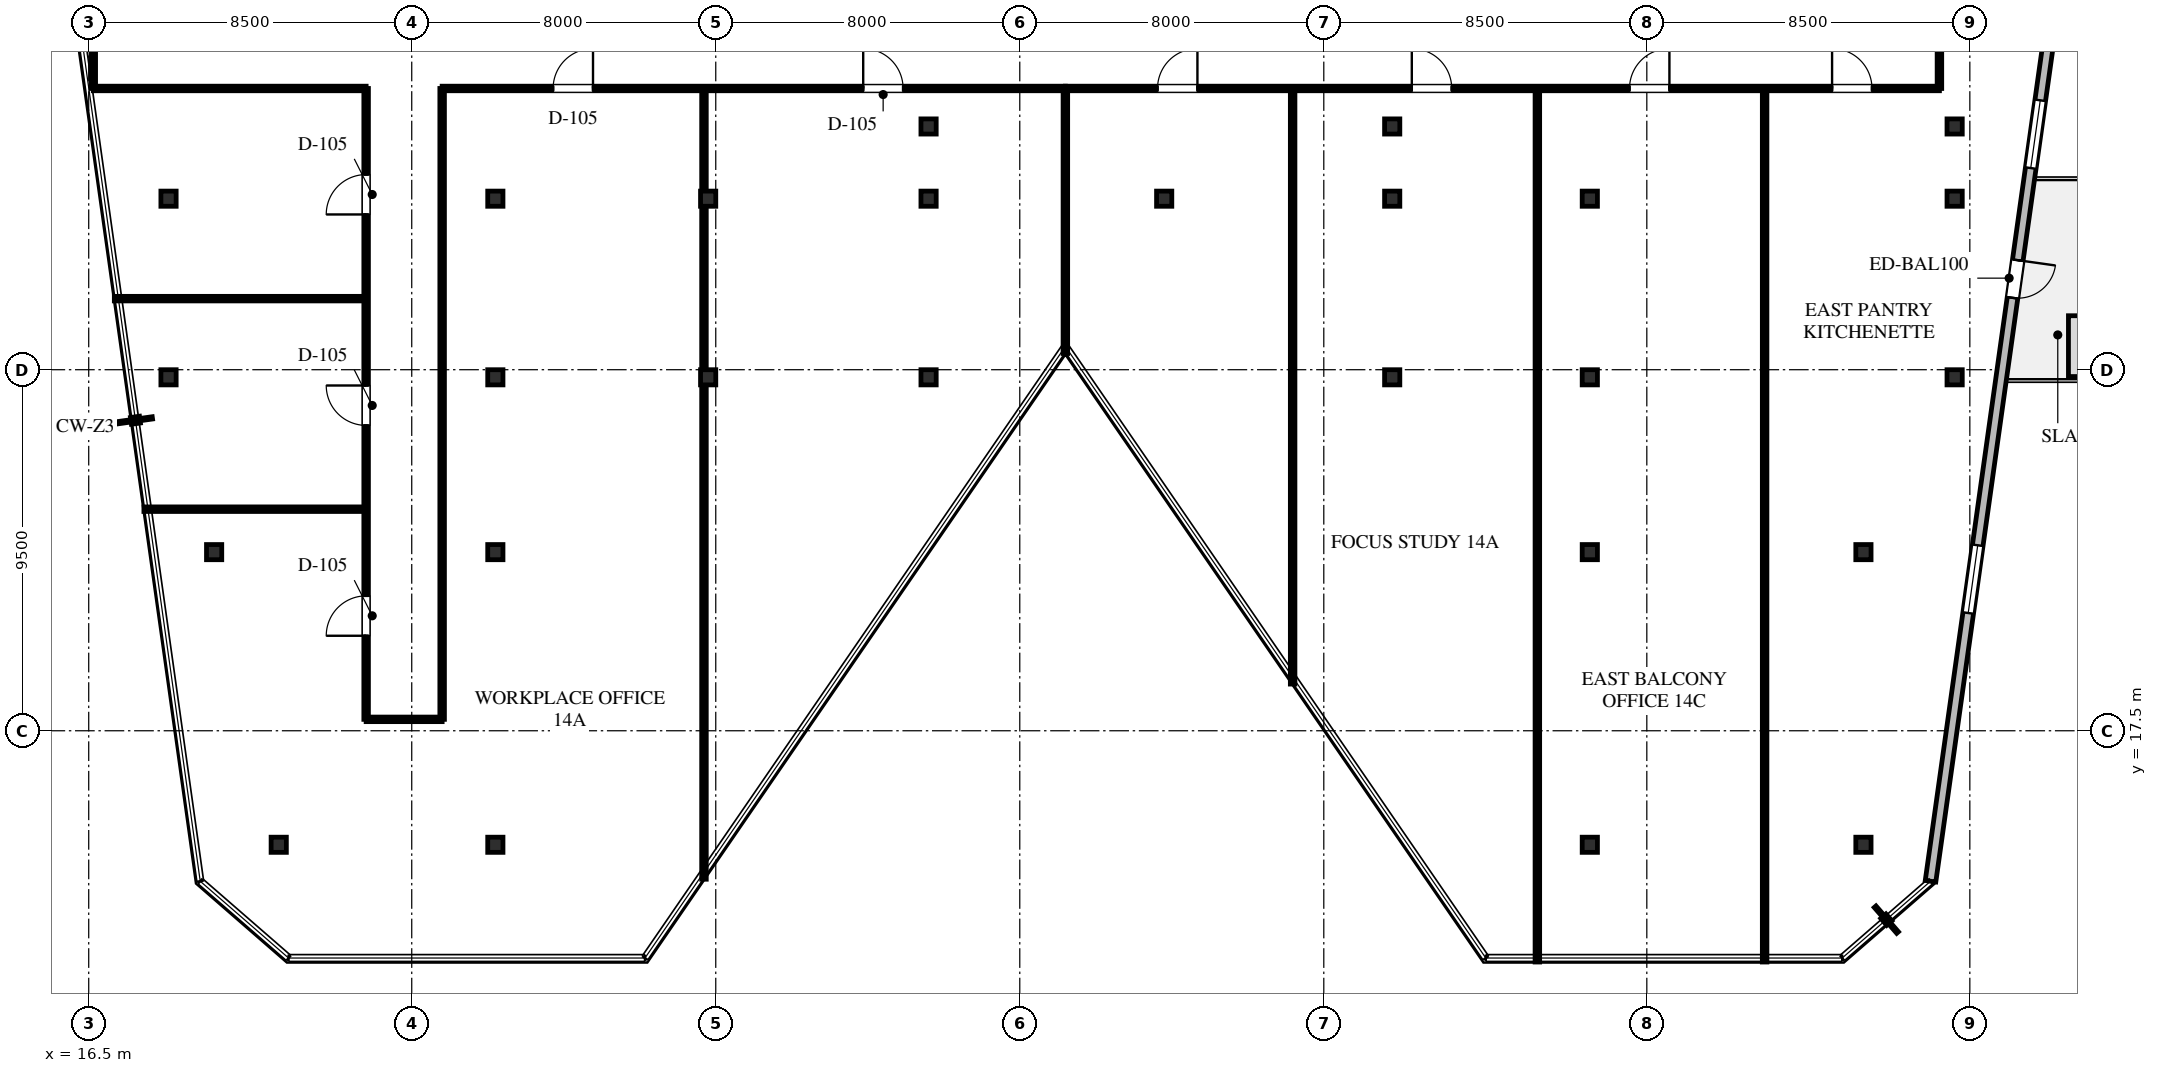
"""IFC4 building model, lengths in metres.
Left out: names, types, materials, properties, quantities, classifications, styles, units other than length and angle.
Written with IfcOpenShell. Run it as: python <this file> out.ifc"""

import sys

from ifc_helpers import new_model, si_unit, direction, frame, frame_2d, origin, origin_2d, place, context, subcontext, project, spatial, rectangle, i_section, extrude, element, fill, save


model = new_model("IFC4")
c1 = context("Model", 3, precision=1e-05, world=origin(), true_north=direction((0.0, 1.0)))
c2 = subcontext(c1, "Body", "Model", "MODEL_VIEW")
j1 = project(units=[si_unit("LENGTHUNIT", "METRE"), si_unit("PLANEANGLEUNIT", "RADIAN")], contexts=[c1])
p1 = place(None, origin())
s1 = spatial("IfcSite", under=j1, at=p1, CompositionType="ELEMENT")
p2 = place(p1, origin())
s2 = spatial("IfcBuilding", under=s1, at=p2, CompositionType="ELEMENT")
p3 = place(p2, frame((0.0, 0.0, 212.5)))
s3 = spatial("IfcBuildingStorey", under=s2, at=p3, CompositionType="ELEMENT", Elevation=212.5)
for number, where, z_axis, x_axis in (
    (1, (21.5, 14.5, 0.0), (0.0, 0.0, 1.0), (1.0, 0.0, 0.0)),
    (2, (18.6, 26.8, 0.0), (0.0, 0.0, 1.0), (1.0, 0.0, 0.0)),
    (3, (27.2, 26.8, 0.0), (0.0, 0.0, 1.0), (1.0, 0.0, 0.0)),
    (4, (32.8, 26.8, 0.0), (0.0, 0.0, 1.0), (1.0, 0.0, 0.0)),
    (5, (38.6, 26.8, 0.0), (0.0, 0.0, 1.0), (1.0, 0.0, 0.0)),
    (6, (50.8, 26.8, 0.0), (0.0, 0.0, 1.0), (1.0, 0.0, 0.0)),
    (7, (56.0, 26.8, 0.0), (0.0, 0.0, 1.0), (1.0, 0.0, 0.0)),
    (8, (65.6, 26.8, 0.0), (0.0, 0.0, 1.0), (1.0, 0.0, 0.0)),
    (9, (18.6, 31.5, 0.0), (0.0, 0.0, 1.0), (1.0, 0.0, 0.0)),
    (10, (27.2, 31.5, 0.0), (0.0, 0.0, 1.0), (1.0, 0.0, 0.0)),
    (11, (32.8, 31.5, 0.0), (0.0, 0.0, 1.0), (1.0, 0.0, 0.0)),
    (12, (27.2, 14.5, 0.0), (0.0, 0.0, 1.0), (1.0, 0.0, 0.0)),
    (13, (38.6, 31.5, 0.0), (0.0, 0.0, 1.0), (1.0, 0.0, 0.0)),
    (14, (44.8, 31.5, 0.0), (0.0, 0.0, 1.0), (1.0, 0.0, 0.0)),
    (15, (50.8, 31.5, 0.0), (0.0, 0.0, 1.0), (1.0, 0.0, 0.0)),
    (16, (56.0, 31.5, 0.0), (0.0, 0.0, 1.0), (1.0, 0.0, 0.0)),
    (17, (65.6, 31.5, 0.0), (0.0, 0.0, 1.0), (1.0, 0.0, 0.0)),
    (18, (56.0, 14.5, 0.0), (0.0, 0.0, 1.0), (1.0, 0.0, 0.0)),
    (19, (63.2, 14.5, 0.0), (0.0, 0.0, 1.0), (1.0, 0.0, 0.0)),
    (20, (19.8, 22.2, 0.0), (0.0, 0.0, 1.0), (1.0, 0.0, 0.0)),
    (21, (27.2, 22.2, 0.0), (0.0, 0.0, 1.0), (1.0, 0.0, 0.0)),
    (22, (56.0, 22.2, 0.0), (0.0, 0.0, 1.0), (1.0, 0.0, 0.0)),
    (23, (63.2, 22.2, 0.0), (0.0, 0.0, 1.0), (1.0, 0.0, 0.0)),
    (24, (38.6, 33.4, 0.0), (0.0, 0.0, 1.0), (1.0, 0.0, 0.0)),
    (25, (50.8, 33.4, 0.0), (0.0, 0.0, 1.0), (1.0, 0.0, 0.0)),
    (26, (65.6, 33.4, 0.0), (0.0, 0.0, 1.0), (1.0, 0.0, 0.0)),
):
    element("IfcColumn", number, at=place(p3, frame(where, z_axis=z_axis, x_axis=x_axis)), inside=s3, PredefinedType="COLUMN", context=c2, shape_type="SweptSolid", body=[
        extrude(i_section(OverallWidth=0.401, OverallDepth=0.399, WebThickness=0.025, FlangeThickness=0.04, FilletRadius=0.03, at=origin_2d()), origin(), (0.0, 0.0, 1.0), 4.0),
    ])
p4 = place(p3, frame((68.375, 37.8, 0.0), z_axis=(0.0, 0.0, 1.0), x_axis=(-0.139173290738, -0.99026804207, 0.0)))
e27 = element("IfcWall", 27, at=p4, inside=s3, PredefinedType="STANDARD", context=c2, shape_type="SweptSolid", body=[
    extrude(rectangle(XDim=24.498, YDim=0.28, at=frame_2d((12.249, 0.0))), origin(), (0.0, 0.0, 1.0), 3.755),
])
p5 = place(p4, frame((7.996, 0.0, 0.0)))
e28 = element("IfcOpeningElement", 28, at=p5, cuts=e27, PredefinedType="OPENING", context=c2, shape_type="SweptSolid", body=[
    extrude(rectangle(XDim=1.0, YDim=2.15, at=frame_2d((0.5, 1.075))), frame((0.0, 0.15, 0.0), z_axis=(0.0, -1.0, 0.0), x_axis=(1.0, 0.0, 0.0)), (0.0, 0.0, 1.0), 0.3),
])
p6 = place(p4, frame((3.749, 0.0, 0.65)))
e29 = element("IfcOpeningElement", 29, at=p6, cuts=e27, PredefinedType="OPENING", context=c2, shape_type="SweptSolid", body=[
    extrude(rectangle(XDim=1.8, YDim=2.1, at=frame_2d((0.9, 1.05))), frame((0.0, 0.15, 0.0), z_axis=(0.0, -1.0, 0.0), x_axis=(1.0, 0.0, 0.0)), (0.0, 0.0, 1.0), 0.3),
])
p7 = place(p4, frame((15.571, 0.0, 0.65)))
e30 = element("IfcOpeningElement", 30, at=p7, cuts=e27, PredefinedType="OPENING", context=c2, shape_type="SweptSolid", body=[
    extrude(rectangle(XDim=1.8, YDim=2.1, at=frame_2d((0.9, 1.05))), frame((0.0, 0.15, 0.0), z_axis=(0.0, -1.0, 0.0), x_axis=(1.0, 0.0, 0.0)), (0.0, 0.0, 1.0), 0.3),
])
p8 = place(p3, frame((16.62, 34.4, 0.0), z_axis=(0.0, 0.0, 1.0), x_axis=(1.0, 0.0, 0.0)))
e31 = element("IfcWall", 31, at=p8, inside=s3, PredefinedType="PARTITIONING", context=c2, shape_type="SweptSolid", body=[
    extrude(rectangle(XDim=7.18, YDim=0.12, at=frame_2d((3.59, 0.0))), origin(), (0.0, 0.0, 1.0), 2.982),
])
p9 = place(p3, frame((25.8, 34.4, 0.0), z_axis=(0.0, 0.0, 1.0), x_axis=(1.0, 0.0, 0.0)))
e32 = element("IfcWall", 32, at=p9, inside=s3, PredefinedType="PARTITIONING", context=c2, shape_type="SweptSolid", body=[
    extrude(rectangle(XDim=16.4, YDim=0.12, at=frame_2d((8.2, 0.0))), origin(), (0.0, 0.0, 1.0), 2.982),
])
p10 = place(p9, frame((2.92, 0.0, 0.0)))
e33 = element("IfcOpeningElement", 33, at=p10, cuts=e32, PredefinedType="OPENING", context=c2, shape_type="SweptSolid", body=[
    extrude(rectangle(XDim=1.05, YDim=2.2, at=frame_2d((0.525, 1.1))), frame((0.0, 0.07, 0.0), z_axis=(0.0, -1.0, 0.0), x_axis=(1.0, 0.0, 0.0)), (0.0, 0.0, 1.0), 0.14),
])
p11 = place(p9, frame((11.08, 0.0, 0.0)))
e34 = element("IfcOpeningElement", 34, at=p11, cuts=e32, PredefinedType="OPENING", context=c2, shape_type="SweptSolid", body=[
    extrude(rectangle(XDim=1.05, YDim=2.2, at=frame_2d((0.525, 1.1))), frame((0.0, 0.07, 0.0), z_axis=(0.0, -1.0, 0.0), x_axis=(1.0, 0.0, 0.0)), (0.0, 0.0, 1.0), 0.14),
])
p12 = place(p3, frame((42.2, 34.4, 0.0), z_axis=(0.0, 0.0, 1.0), x_axis=(1.0, 0.0, 0.0)))
e35 = element("IfcWall", 35, at=p12, inside=s3, PredefinedType="PARTITIONING", context=c2, shape_type="SweptSolid", body=[
    extrude(rectangle(XDim=23.0, YDim=0.12, at=frame_2d((11.5, 0.0))), origin(), (0.0, 0.0, 1.0), 2.982),
])
p13 = place(p12, frame((2.425, 0.0, 0.0)))
e36 = element("IfcOpeningElement", 36, at=p13, cuts=e35, PredefinedType="OPENING", context=c2, shape_type="SweptSolid", body=[
    extrude(rectangle(XDim=1.05, YDim=2.2, at=frame_2d((0.525, 1.1))), frame((0.0, 0.07, 0.0), z_axis=(0.0, -1.0, 0.0), x_axis=(1.0, 0.0, 0.0)), (0.0, 0.0, 1.0), 0.14),
])
p14 = place(p12, frame((9.116, 0.0, 0.0)))
e37 = element("IfcOpeningElement", 37, at=p14, cuts=e35, PredefinedType="OPENING", context=c2, shape_type="SweptSolid", body=[
    extrude(rectangle(XDim=1.05, YDim=2.2, at=frame_2d((0.525, 1.1))), frame((0.0, 0.07, 0.0), z_axis=(0.0, -1.0, 0.0), x_axis=(1.0, 0.0, 0.0)), (0.0, 0.0, 1.0), 0.14),
])
p15 = place(p12, frame((14.845, 0.0, 0.0)))
e38 = element("IfcOpeningElement", 38, at=p15, cuts=e35, PredefinedType="OPENING", context=c2, shape_type="SweptSolid", body=[
    extrude(rectangle(XDim=1.05, YDim=2.2, at=frame_2d((0.525, 1.1))), frame((0.0, 0.07, 0.0), z_axis=(0.0, -1.0, 0.0), x_axis=(1.0, 0.0, 0.0)), (0.0, 0.0, 1.0), 0.14),
])
p16 = place(p12, frame((20.175, 0.0, 0.0)))
e39 = element("IfcOpeningElement", 39, at=p16, cuts=e35, PredefinedType="OPENING", context=c2, shape_type="SweptSolid", body=[
    extrude(rectangle(XDim=1.05, YDim=2.2, at=frame_2d((0.525, 1.1))), frame((0.0, 0.07, 0.0), z_axis=(0.0, -1.0, 0.0), x_axis=(1.0, 0.0, 0.0)), (0.0, 0.0, 1.0), 0.14),
])
p17 = place(p3, frame((16.62, 34.4, 0.0), z_axis=(0.0, 0.0, 1.0), x_axis=(0.0, 1.0, 0.0)))
e40 = element("IfcWall", 40, at=p17, inside=s3, PredefinedType="PARTITIONING", context=c2, shape_type="SweptSolid", body=[
    extrude(rectangle(XDim=3.65, YDim=0.12, at=frame_2d((1.825, 0.0))), origin(), (0.0, 0.0, 1.0), 3.755),
])
p18 = place(p3, frame((65.2, 34.4, 0.0), z_axis=(0.0, 0.0, 1.0), x_axis=(0.0, 1.0, 0.0)))
e41 = element("IfcWall", 41, at=p18, inside=s3, PredefinedType="PARTITIONING", context=c2, shape_type="SweptSolid", body=[
    extrude(rectangle(XDim=3.317, YDim=0.12, at=frame_2d((1.659, 0.0))), origin(), (0.0, 0.0, 1.0), 2.982),
])
p19 = place(p3, frame((23.8, 17.8, 0.0), z_axis=(0.0, 0.0, 1.0), x_axis=(0.0, 1.0, 0.0)))
e42 = element("IfcWall", 42, at=p19, inside=s3, PredefinedType="PARTITIONING", context=c2, shape_type="SweptSolid", body=[
    extrude(rectangle(XDim=16.6, YDim=0.12, at=frame_2d((8.3, 0.0))), origin(), (0.0, 0.0, 1.0), 2.982),
])
p20 = place(p19, frame((2.2, 0.0, 0.0)))
e43 = element("IfcOpeningElement", 43, at=p20, cuts=e42, PredefinedType="OPENING", context=c2, shape_type="SweptSolid", body=[
    extrude(rectangle(XDim=1.05, YDim=2.2, at=frame_2d((0.525, 1.1))), frame((0.0, 0.07, 0.0), z_axis=(0.0, -1.0, 0.0), x_axis=(1.0, 0.0, 0.0)), (0.0, 0.0, 1.0), 0.14),
])
p21 = place(p19, frame((7.735, 0.0, 0.0)))
e44 = element("IfcOpeningElement", 44, at=p21, cuts=e42, PredefinedType="OPENING", context=c2, shape_type="SweptSolid", body=[
    extrude(rectangle(XDim=1.05, YDim=2.2, at=frame_2d((0.525, 1.1))), frame((0.0, 0.07, 0.0), z_axis=(0.0, -1.0, 0.0), x_axis=(1.0, 0.0, 0.0)), (0.0, 0.0, 1.0), 0.14),
])
p22 = place(p19, frame((13.285, 0.0, 0.0)))
e45 = element("IfcOpeningElement", 45, at=p22, cuts=e42, PredefinedType="OPENING", context=c2, shape_type="SweptSolid", body=[
    extrude(rectangle(XDim=1.05, YDim=2.2, at=frame_2d((0.525, 1.1))), frame((0.0, 0.07, 0.0), z_axis=(0.0, -1.0, 0.0), x_axis=(1.0, 0.0, 0.0)), (0.0, 0.0, 1.0), 0.14),
])
p23 = place(p3, frame((25.8, 17.8, 0.0), z_axis=(0.0, 0.0, 1.0), x_axis=(0.0, 1.0, 0.0)))
e46 = element("IfcWall", 46, at=p23, inside=s3, PredefinedType="PARTITIONING", context=c2, shape_type="SweptSolid", body=[
    extrude(rectangle(XDim=16.6, YDim=0.12, at=frame_2d((8.3, 0.0))), origin(), (0.0, 0.0, 1.0), 2.982),
])
p24 = place(p3, frame((23.8, 17.8, 0.0), z_axis=(0.0, 0.0, 1.0), x_axis=(1.0, 0.0, 0.0)))
e47 = element("IfcWall", 47, at=p24, inside=s3, PredefinedType="PARTITIONING", context=c2, shape_type="SweptSolid", body=[
    extrude(rectangle(XDim=2.0, YDim=0.12, at=frame_2d((1.0, 0.0))), origin(), (0.0, 0.0, 1.0), 3.147),
])
p25 = place(p3, frame((17.953, 23.33, 0.0), z_axis=(0.0, 0.0, 1.0), x_axis=(1.0, 0.0, 0.0)))
e48 = element("IfcWall", 48, at=p25, inside=s3, PredefinedType="PARTITIONING", context=c2, shape_type="SweptSolid", body=[
    extrude(rectangle(XDim=5.779, YDim=0.12, at=frame_2d((2.89, 0.0))), origin(), (0.0, 0.0, 1.0), 3.147),
])
p26 = place(p3, frame((17.174, 28.87, 0.0), z_axis=(0.0, 0.0, 1.0), x_axis=(1.0, 0.0, 0.0)))
e49 = element("IfcWall", 49, at=p26, inside=s3, PredefinedType="PARTITIONING", context=c2, shape_type="SweptSolid", body=[
    extrude(rectangle(XDim=6.558, YDim=0.12, at=frame_2d((3.279, 0.0))), origin(), (0.0, 0.0, 1.0), 2.982),
])
p27 = place(p3, frame((42.2, 27.427, 0.0), z_axis=(0.0, 0.0, 1.0), x_axis=(0.0, 1.0, 0.0)))
e50 = element("IfcWall", 50, at=p27, inside=s3, PredefinedType="PARTITIONING", context=c2, shape_type="SweptSolid", body=[
    extrude(rectangle(XDim=6.973, YDim=0.12, at=frame_2d((3.487, 0.0))), origin(), (0.0, 0.0, 1.0), 2.982),
])
p28 = place(p3, frame((32.69, 13.594, 0.0), z_axis=(0.0, 0.0, 1.0), x_axis=(0.0, 1.0, 0.0)))
e51 = element("IfcWall", 51, at=p28, inside=s3, PredefinedType="PARTITIONING", context=c2, shape_type="SweptSolid", body=[
    extrude(rectangle(XDim=20.738, YDim=0.12, at=frame_2d((10.369, 0.0))), origin(), (0.0, 0.0, 1.0), 2.982),
])
p29 = place(p3, frame((48.18, 18.728, 0.0), z_axis=(0.0, 0.0, 1.0), x_axis=(0.0, 1.0, 0.0)))
e52 = element("IfcWall", 52, at=p29, inside=s3, PredefinedType="PARTITIONING", context=c2, shape_type="SweptSolid", body=[
    extrude(rectangle(XDim=15.604, YDim=0.12, at=frame_2d((7.802, 0.0))), origin(), (0.0, 0.0, 1.0), 2.982),
])
for number, where, z_axis, x_axis in (
    (53, (54.62, 11.415, 0.0), (0.0, 0.0, 1.0), (0.0, 1.0, 0.0)),
    (54, (60.6, 11.415, 0.0), (0.0, 0.0, 1.0), (0.0, 1.0, 0.0)),
):
    element("IfcWall", number, at=place(p3, frame(where, z_axis=z_axis, x_axis=x_axis)), inside=s3, PredefinedType="PARTITIONING", context=c2, shape_type="SweptSolid", body=[
        extrude(rectangle(XDim=22.917, YDim=0.12, at=frame_2d((11.458, 0.0))), origin(), (0.0, 0.0, 1.0), 2.982),
    ])
p30 = place(p5, origin())
e55 = element("IfcDoor", 55, at=p30, inside=s3, OperationType="SINGLE_SWING_LEFT", PredefinedType="DOOR", context=c2, shape_type="SweptSolid", body=[
    extrude(rectangle(XDim=1.0, YDim=2.15, at=frame_2d((0.5, 1.075))), frame((0.0, 0.025, 0.0), z_axis=(0.0, -1.0, 0.0), x_axis=(1.0, 0.0, 0.0)), (0.0, 0.0, 1.0), 0.05),
])
fill(e28, e55)
p31 = place(p6, origin())
e56 = element("IfcWindow", 56, at=p31, inside=s3, PartitioningType="SINGLE_PANEL", PredefinedType="WINDOW", context=c2, shape_type="SweptSolid", body=[
    extrude(rectangle(XDim=1.8, YDim=2.1, at=frame_2d((0.9, 1.05))), frame((0.0, 0.03, 0.0), z_axis=(0.0, -1.0, 0.0), x_axis=(1.0, 0.0, 0.0)), (0.0, 0.0, 1.0), 0.06),
])
fill(e29, e56)
p32 = place(p7, origin())
e57 = element("IfcWindow", 57, at=p32, inside=s3, PartitioningType="SINGLE_PANEL", PredefinedType="WINDOW", context=c2, shape_type="SweptSolid", body=[
    extrude(rectangle(XDim=1.8, YDim=2.1, at=frame_2d((0.9, 1.05))), frame((0.0, 0.03, 0.0), z_axis=(0.0, -1.0, 0.0), x_axis=(1.0, 0.0, 0.0)), (0.0, 0.0, 1.0), 0.06),
])
fill(e30, e57)
p33 = place(p20, origin())
e58 = element("IfcDoor", 58, at=p33, inside=s3, OperationType="SINGLE_SWING_LEFT", PredefinedType="DOOR", context=c2, shape_type="SweptSolid", body=[
    extrude(rectangle(XDim=1.05, YDim=2.2, at=frame_2d((0.525, 1.1))), frame((0.0, 0.025, 0.0), z_axis=(0.0, -1.0, 0.0), x_axis=(1.0, 0.0, 0.0)), (0.0, 0.0, 1.0), 0.05),
])
fill(e43, e58)
p34 = place(p21, origin())
e59 = element("IfcDoor", 59, at=p34, inside=s3, OperationType="SINGLE_SWING_RIGHT", PredefinedType="DOOR", context=c2, shape_type="SweptSolid", body=[
    extrude(rectangle(XDim=1.05, YDim=2.2, at=frame_2d((0.525, 1.1))), frame((0.0, 0.025, 0.0), z_axis=(0.0, -1.0, 0.0), x_axis=(1.0, 0.0, 0.0)), (0.0, 0.0, 1.0), 0.05),
])
fill(e44, e59)
p35 = place(p22, origin())
e60 = element("IfcDoor", 60, at=p35, inside=s3, OperationType="SINGLE_SWING_LEFT", PredefinedType="DOOR", context=c2, shape_type="SweptSolid", body=[
    extrude(rectangle(XDim=1.05, YDim=2.2, at=frame_2d((0.525, 1.1))), frame((0.0, 0.025, 0.0), z_axis=(0.0, -1.0, 0.0), x_axis=(1.0, 0.0, 0.0)), (0.0, 0.0, 1.0), 0.05),
])
fill(e45, e60)
p36 = place(p10, origin())
e61 = element("IfcDoor", 61, at=p36, inside=s3, OperationType="SINGLE_SWING_RIGHT", PredefinedType="DOOR", context=c2, shape_type="SweptSolid", body=[
    extrude(rectangle(XDim=1.05, YDim=2.2, at=frame_2d((0.525, 1.1))), frame((0.0, 0.025, 0.0), z_axis=(0.0, -1.0, 0.0), x_axis=(1.0, 0.0, 0.0)), (0.0, 0.0, 1.0), 0.05),
])
fill(e33, e61)
p37 = place(p11, origin())
e62 = element("IfcDoor", 62, at=p37, inside=s3, OperationType="SINGLE_SWING_LEFT", PredefinedType="DOOR", context=c2, shape_type="SweptSolid", body=[
    extrude(rectangle(XDim=1.05, YDim=2.2, at=frame_2d((0.525, 1.1))), frame((0.0, 0.025, 0.0), z_axis=(0.0, -1.0, 0.0), x_axis=(1.0, 0.0, 0.0)), (0.0, 0.0, 1.0), 0.05),
])
fill(e34, e62)
p38 = place(p13, origin())
e63 = element("IfcDoor", 63, at=p38, inside=s3, OperationType="SINGLE_SWING_RIGHT", PredefinedType="DOOR", context=c2, shape_type="SweptSolid", body=[
    extrude(rectangle(XDim=1.05, YDim=2.2, at=frame_2d((0.525, 1.1))), frame((0.0, 0.025, 0.0), z_axis=(0.0, -1.0, 0.0), x_axis=(1.0, 0.0, 0.0)), (0.0, 0.0, 1.0), 0.05),
])
fill(e36, e63)
p39 = place(p14, origin())
e64 = element("IfcDoor", 64, at=p39, inside=s3, OperationType="SINGLE_SWING_LEFT", PredefinedType="DOOR", context=c2, shape_type="SweptSolid", body=[
    extrude(rectangle(XDim=1.05, YDim=2.2, at=frame_2d((0.525, 1.1))), frame((0.0, 0.025, 0.0), z_axis=(0.0, -1.0, 0.0), x_axis=(1.0, 0.0, 0.0)), (0.0, 0.0, 1.0), 0.05),
])
fill(e37, e64)
p40 = place(p15, origin())
e65 = element("IfcDoor", 65, at=p40, inside=s3, OperationType="SINGLE_SWING_RIGHT", PredefinedType="DOOR", context=c2, shape_type="SweptSolid", body=[
    extrude(rectangle(XDim=1.05, YDim=2.2, at=frame_2d((0.525, 1.1))), frame((0.0, 0.025, 0.0), z_axis=(0.0, -1.0, 0.0), x_axis=(1.0, 0.0, 0.0)), (0.0, 0.0, 1.0), 0.05),
])
fill(e38, e65)
p41 = place(p16, origin())
e66 = element("IfcDoor", 66, at=p41, inside=s3, OperationType="SINGLE_SWING_LEFT", PredefinedType="DOOR", context=c2, shape_type="SweptSolid", body=[
    extrude(rectangle(XDim=1.05, YDim=2.2, at=frame_2d((0.525, 1.1))), frame((0.0, 0.025, 0.0), z_axis=(0.0, -1.0, 0.0), x_axis=(1.0, 0.0, 0.0)), (0.0, 0.0, 1.0), 0.05),
])
fill(e39, e66)
save(model, sys.argv[1])
